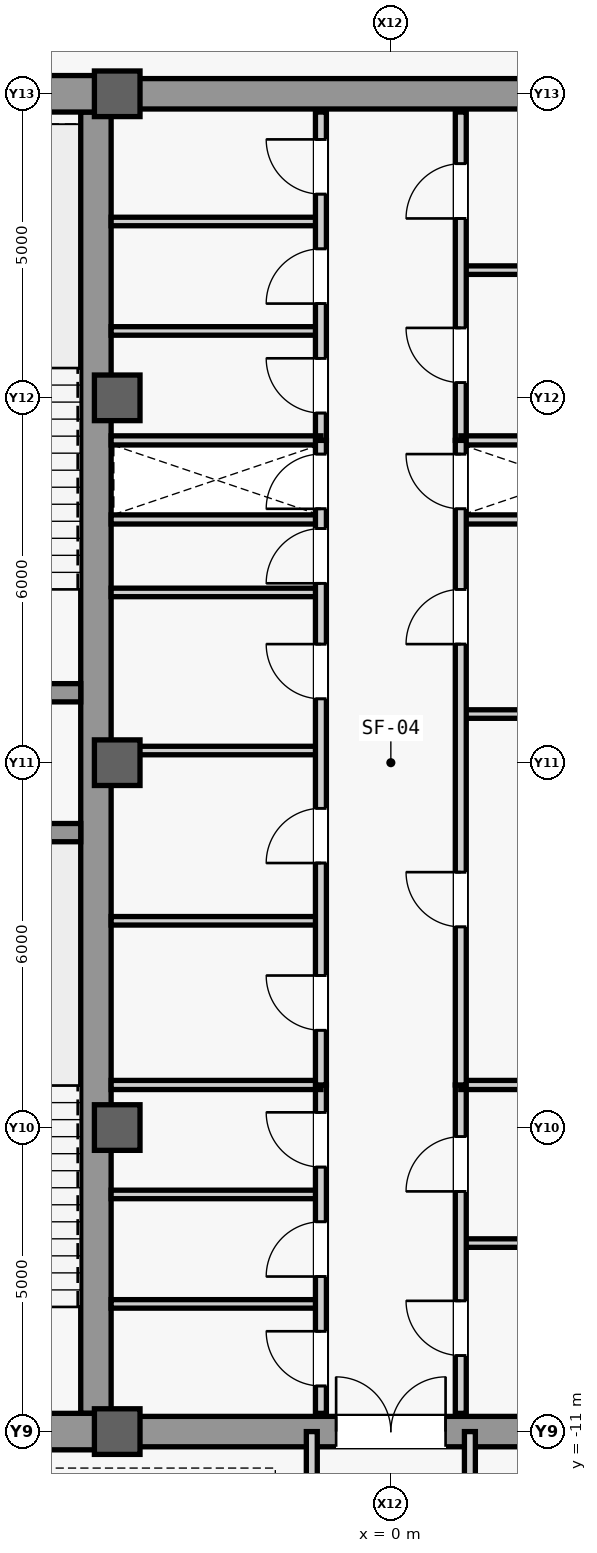
"""IFC4 building model, lengths in metres.
Left out: names, types, materials, properties, quantities, classifications, styles, units other than length and angle.
Written with IfcOpenShell. Run it as: python <this file> out.ifc"""

import sys

from ifc_helpers import new_model, si_unit, direction, frame, frame_2d, origin, origin_2d, place, context, subcontext, project, spatial, rectangle, extrude, source, transform, mapped, element, fill, save


model = new_model("IFC4")
c1 = context("Model", 3, precision=1e-05, world=origin(), true_north=direction((0.0, 1.0)))
c2 = subcontext(c1, "Body", "Model", "MODEL_VIEW")
j1 = project(units=[si_unit("LENGTHUNIT", "METRE"), si_unit("PLANEANGLEUNIT", "RADIAN")], contexts=[c1])
p1 = place(None, origin())
s1 = spatial("IfcSite", under=j1, at=p1, CompositionType="ELEMENT")
p2 = place(p1, origin())
s2 = spatial("IfcBuilding", under=s1, at=p2, CompositionType="ELEMENT")
p3 = place(p2, frame((0.0, 0.0, 321.5)))
s3 = spatial("IfcBuildingStorey", under=s2, at=p3, CompositionType="ELEMENT", Elevation=321.5)
m1 = source(origin(), c2, "Body", "SweptSolid", [
    extrude(rectangle(XDim=21.4, YDim=0.5, at=frame_2d((10.7, 0.0))), origin(), (0.0, 0.0, 1.0), 4.54),
])
p4 = place(p3, frame((-4.85, -10.7, 0.0), z_axis=(0.0, 0.0, 1.0), x_axis=(0.0, 1.0, 0.0)))
e1 = element("IfcWall", 1, at=p4, inside=s3, PredefinedType="SHEAR", context=c2, shape_type="MappedRepresentation", body=[
    mapped(m1, transform((0.0, 0.0, 0.0), scale=1.0)),
])
m2 = source(origin(), c2, "Body", "SweptSolid", [
    extrude(rectangle(XDim=5.9, YDim=0.6, at=frame_2d((2.95, 0.0))), origin(), (0.0, 0.0, 1.0), 4.54),
])
for number, where, z_axis, x_axis in (
    (2, (-10.75, -11.0, 0.0), (0.0, 0.0, 1.0), (1.0, 0.0, 0.0)),
    (3, (-10.75, 11.0, 0.0), (0.0, 0.0, 1.0), (1.0, 0.0, 0.0)),
):
    element("IfcWall", number, at=place(p3, frame(where, z_axis=z_axis, x_axis=x_axis)), inside=s3, PredefinedType="SHEAR", context=c2, shape_type="MappedRepresentation", body=[
        mapped(m2, transform((0.0, 0.0, 0.0), scale=1.0)),
    ])
m3 = source(origin(), c2, "Body", "SweptSolid", [
    extrude(rectangle(XDim=5.65, YDim=0.3, at=frame_2d((2.825, 0.0))), origin(), (0.0, 0.0, 1.0), 4.54),
])
for number, where, z_axis, x_axis in (
    (4, (-10.75, -1.15, 0.0), (0.0, 0.0, 1.0), (1.0, 0.0, 0.0)),
    (5, (-10.75, 1.15, 0.0), (0.0, 0.0, 1.0), (1.0, 0.0, 0.0)),
):
    element("IfcWall", number, at=place(p3, frame(where, z_axis=z_axis, x_axis=x_axis)), inside=s3, PredefinedType="SHEAR", context=c2, shape_type="MappedRepresentation", body=[
        mapped(m3, transform((0.0, 0.0, 0.0), scale=1.0)),
    ])
m4 = source(origin(), c2, "Body", "SweptSolid", [
    extrude(rectangle(XDim=9.2, YDim=0.5, at=frame_2d((4.6, 0.0))), origin(), (0.0, 0.0, 1.0), 4.54),
])
p5 = place(p3, frame((-4.6, -11.0, 0.0), z_axis=(0.0, 0.0, 1.0), x_axis=(1.0, 0.0, 0.0)))
e6 = element("IfcWall", 6, at=p5, inside=s3, PredefinedType="SHEAR", context=c2, shape_type="MappedRepresentation", body=[
    mapped(m4, transform((0.0, 0.0, 0.0), scale=1.0)),
])
m5 = source(origin(), c2, "Body", "SweptSolid", [
    extrude(rectangle(XDim=1.8, YDim=2.25, at=frame_2d((0.9, 1.125))), frame((0.0, 0.26, 0.0), z_axis=(0.0, -1.0, 0.0), x_axis=(1.0, 0.0, 0.0)), (0.0, 0.0, 1.0), 0.52),
])
p6 = place(p5, frame((3.7, 0.0, 0.0)))
e7 = element("IfcOpeningElement", 7, at=p6, cuts=e6, PredefinedType="OPENING", context=c2, shape_type="MappedRepresentation", body=[
    mapped(m5, transform((0.0, 0.0, 0.0), scale=1.0)),
])
p7 = place(p3, frame((-4.6, 11.0, 0.0), z_axis=(0.0, 0.0, 1.0), x_axis=(1.0, 0.0, 0.0)))
e8 = element("IfcWall", 8, at=p7, inside=s3, PredefinedType="SHEAR", context=c2, shape_type="MappedRepresentation", body=[
    mapped(m4, transform((0.0, 0.0, 0.0), scale=1.0)),
])
m6 = source(origin(), c2, "Body", "SweptSolid", [
    extrude(rectangle(XDim=0.75, YDim=0.75, at=origin_2d()), origin(), (0.0, 0.0, 1.0), 4.8),
])
for number, where, z_axis, x_axis in (
    (9, (-4.5, -11.0, 0.0), (0.0, 0.0, 1.0), (1.0, 0.0, 0.0)),
    (10, (-4.5, -6.0, 0.0), (0.0, 0.0, 1.0), (1.0, 0.0, 0.0)),
    (11, (-4.5, 0.0, 0.0), (0.0, 0.0, 1.0), (1.0, 0.0, 0.0)),
    (12, (-4.5, 6.0, 0.0), (0.0, 0.0, 1.0), (1.0, 0.0, 0.0)),
    (13, (-4.5, 11.0, 0.0), (0.0, 0.0, 1.0), (1.0, 0.0, 0.0)),
):
    element("IfcColumn", number, at=place(p3, frame(where, z_axis=z_axis, x_axis=x_axis)), inside=s3, PredefinedType="COLUMN", context=c2, shape_type="MappedRepresentation", body=[
        mapped(m6, transform((0.0, 0.0, 0.0), scale=1.0)),
    ])
m7 = source(origin(), c2, "Body", "SweptSolid", [
    extrude(rectangle(XDim=3.45, YDim=0.15, at=frame_2d((1.725, 0.0))), origin(), (0.0, 0.0, 1.0), 4.54),
])
for number, where, z_axis, x_axis in (
    (14, (-4.6, 4.0, 0.0), (0.0, 0.0, 1.0), (1.0, 0.0, 0.0)),
    (15, (1.15, 4.0, 0.0), (0.0, 0.0, 1.0), (1.0, 0.0, 0.0)),
):
    element("IfcWall", number, at=place(p3, frame(where, z_axis=z_axis, x_axis=x_axis)), inside=s3, PredefinedType="PARTITIONING", context=c2, shape_type="MappedRepresentation", body=[
        mapped(m7, transform((0.0, 0.0, 0.0), scale=1.0)),
    ])
m8 = source(origin(), c2, "Body", "SweptSolid", [
    extrude(rectangle(XDim=3.45, YDim=0.14, at=frame_2d((1.725, 0.0))), origin(), (0.0, 0.0, 1.0), 4.54),
])
for number, where, z_axis, x_axis in (
    (16, (-4.6, -8.9, 0.0), (0.0, 0.0, 1.0), (1.0, 0.0, 0.0)),
    (17, (-4.6, -7.1, 0.0), (0.0, 0.0, 1.0), (1.0, 0.0, 0.0)),
):
    element("IfcWall", number, at=place(p3, frame(where, z_axis=z_axis, x_axis=x_axis)), inside=s3, PredefinedType="PARTITIONING", context=c2, shape_type="MappedRepresentation", body=[
        mapped(m8, transform((0.0, 0.0, 0.0), scale=1.0)),
    ])
m9 = source(origin(), c2, "Body", "SweptSolid", [
    extrude(rectangle(XDim=5.4, YDim=0.18, at=frame_2d((2.7, 0.0))), origin(), (0.0, 0.0, 1.0), 4.54),
])
p8 = place(p3, frame((-1.15, -10.7, 0.0), z_axis=(0.0, 0.0, 1.0), x_axis=(0.0, 1.0, 0.0)))
e18 = element("IfcWall", 18, at=p8, inside=s3, PredefinedType="PARTITIONING", context=c2, shape_type="MappedRepresentation", body=[
    mapped(m9, transform((0.0, 0.0, 0.0), scale=1.0)),
])
m10 = source(origin(), c2, "Body", "SweptSolid", [
    extrude(rectangle(XDim=0.9, YDim=2.15, at=frame_2d((0.45, 1.075))), frame((0.0, 0.1, 0.0), z_axis=(0.0, -1.0, 0.0), x_axis=(1.0, 0.0, 0.0)), (0.0, 0.0, 1.0), 0.2),
])
p9 = place(p8, frame((0.45, 0.0, 0.0)))
e19 = element("IfcOpeningElement", 19, at=p9, cuts=e18, PredefinedType="OPENING", context=c2, shape_type="MappedRepresentation", body=[
    mapped(m10, transform((0.0, 0.0, 0.0), scale=1.0)),
])
p10 = place(p8, frame((2.25, 0.0, 0.0)))
e20 = element("IfcOpeningElement", 20, at=p10, cuts=e18, PredefinedType="OPENING", context=c2, shape_type="MappedRepresentation", body=[
    mapped(m10, transform((0.0, 0.0, 0.0), scale=1.0)),
])
p11 = place(p8, frame((4.05, 0.0, 0.0)))
e21 = element("IfcOpeningElement", 21, at=p11, cuts=e18, PredefinedType="OPENING", context=c2, shape_type="MappedRepresentation", body=[
    mapped(m10, transform((0.0, 0.0, 0.0), scale=1.0)),
])
p12 = place(p3, frame((1.15, -7.9, 0.0), z_axis=(0.0, 0.0, 1.0), x_axis=(1.0, 0.0, 0.0)))
e22 = element("IfcWall", 22, at=p12, inside=s3, PredefinedType="PARTITIONING", context=c2, shape_type="MappedRepresentation", body=[
    mapped(m8, transform((0.0, 0.0, 0.0), scale=1.0)),
])
p13 = place(p3, frame((1.15, -10.7, 0.0), z_axis=(0.0, 0.0, 1.0), x_axis=(0.0, 1.0, 0.0)))
e23 = element("IfcWall", 23, at=p13, inside=s3, PredefinedType="PARTITIONING", context=c2, shape_type="MappedRepresentation", body=[
    mapped(m9, transform((0.0, 0.0, 0.0), scale=1.0)),
])
p14 = place(p13, frame((0.95, 0.0, 0.0)))
e24 = element("IfcOpeningElement", 24, at=p14, cuts=e23, PredefinedType="OPENING", context=c2, shape_type="MappedRepresentation", body=[
    mapped(m10, transform((0.0, 0.0, 0.0), scale=1.0)),
])
p15 = place(p13, frame((3.65, 0.0, 0.0)))
e25 = element("IfcOpeningElement", 25, at=p15, cuts=e23, PredefinedType="OPENING", context=c2, shape_type="MappedRepresentation", body=[
    mapped(m10, transform((0.0, 0.0, 0.0), scale=1.0)),
])
for number, where, z_axis, x_axis in (
    (26, (-4.6, -5.3, 0.0), (0.0, 0.0, 1.0), (1.0, 0.0, 0.0)),
    (27, (1.15, -5.3, 0.0), (0.0, 0.0, 1.0), (1.0, 0.0, 0.0)),
):
    element("IfcWall", number, at=place(p3, frame(where, z_axis=z_axis, x_axis=x_axis)), inside=s3, PredefinedType="PARTITIONING", context=c2, shape_type="MappedRepresentation", body=[
        mapped(m7, transform((0.0, 0.0, 0.0), scale=1.0)),
    ])
for number, where, z_axis, x_axis in (
    (28, (-4.6, 7.1, 0.0), (0.0, 0.0, 1.0), (1.0, 0.0, 0.0)),
    (29, (-4.6, 8.9, 0.0), (0.0, 0.0, 1.0), (1.0, 0.0, 0.0)),
):
    element("IfcWall", number, at=place(p3, frame(where, z_axis=z_axis, x_axis=x_axis)), inside=s3, PredefinedType="PARTITIONING", context=c2, shape_type="MappedRepresentation", body=[
        mapped(m8, transform((0.0, 0.0, 0.0), scale=1.0)),
    ])
p16 = place(p3, frame((-1.15, 5.3, 0.0), z_axis=(0.0, 0.0, 1.0), x_axis=(0.0, 1.0, 0.0)))
e30 = element("IfcWall", 30, at=p16, inside=s3, PredefinedType="PARTITIONING", context=c2, shape_type="MappedRepresentation", body=[
    mapped(m9, transform((0.0, 0.0, 0.0), scale=1.0)),
])
p17 = place(p16, frame((0.45, 0.0, 0.0)))
e31 = element("IfcOpeningElement", 31, at=p17, cuts=e30, PredefinedType="OPENING", context=c2, shape_type="MappedRepresentation", body=[
    mapped(m10, transform((0.0, 0.0, 0.0), scale=1.0)),
])
p18 = place(p16, frame((2.25, 0.0, 0.0)))
e32 = element("IfcOpeningElement", 32, at=p18, cuts=e30, PredefinedType="OPENING", context=c2, shape_type="MappedRepresentation", body=[
    mapped(m10, transform((0.0, 0.0, 0.0), scale=1.0)),
])
p19 = place(p16, frame((4.05, 0.0, 0.0)))
e33 = element("IfcOpeningElement", 33, at=p19, cuts=e30, PredefinedType="OPENING", context=c2, shape_type="MappedRepresentation", body=[
    mapped(m10, transform((0.0, 0.0, 0.0), scale=1.0)),
])
p20 = place(p3, frame((1.15, 8.1, 0.0), z_axis=(0.0, 0.0, 1.0), x_axis=(1.0, 0.0, 0.0)))
e34 = element("IfcWall", 34, at=p20, inside=s3, PredefinedType="PARTITIONING", context=c2, shape_type="MappedRepresentation", body=[
    mapped(m8, transform((0.0, 0.0, 0.0), scale=1.0)),
])
p21 = place(p3, frame((1.15, 5.3, 0.0), z_axis=(0.0, 0.0, 1.0), x_axis=(0.0, 1.0, 0.0)))
e35 = element("IfcWall", 35, at=p21, inside=s3, PredefinedType="PARTITIONING", context=c2, shape_type="MappedRepresentation", body=[
    mapped(m9, transform((0.0, 0.0, 0.0), scale=1.0)),
])
p22 = place(p21, frame((0.95, 0.0, 0.0)))
e36 = element("IfcOpeningElement", 36, at=p22, cuts=e35, PredefinedType="OPENING", context=c2, shape_type="MappedRepresentation", body=[
    mapped(m10, transform((0.0, 0.0, 0.0), scale=1.0)),
])
p23 = place(p21, frame((3.65, 0.0, 0.0)))
e37 = element("IfcOpeningElement", 37, at=p23, cuts=e35, PredefinedType="OPENING", context=c2, shape_type="MappedRepresentation", body=[
    mapped(m10, transform((0.0, 0.0, 0.0), scale=1.0)),
])
for number, where, z_axis, x_axis in (
    (38, (-4.6, 5.3, 0.0), (0.0, 0.0, 1.0), (1.0, 0.0, 0.0)),
    (39, (1.15, 5.3, 0.0), (0.0, 0.0, 1.0), (1.0, 0.0, 0.0)),
):
    element("IfcWall", number, at=place(p3, frame(where, z_axis=z_axis, x_axis=x_axis)), inside=s3, PredefinedType="PARTITIONING", context=c2, shape_type="MappedRepresentation", body=[
        mapped(m7, transform((0.0, 0.0, 0.0), scale=1.0)),
    ])
p24 = place(p3, frame((-4.6, -2.6, 0.0), z_axis=(0.0, 0.0, 1.0), x_axis=(1.0, 0.0, 0.0)))
e40 = element("IfcWall", 40, at=p24, inside=s3, PredefinedType="PARTITIONING", context=c2, shape_type="MappedRepresentation", body=[
    mapped(m8, transform((0.0, 0.0, 0.0), scale=1.0)),
])
m11 = source(origin(), c2, "Body", "SweptSolid", [
    extrude(rectangle(XDim=3.45, YDim=0.14, at=frame_2d((1.725, 0.0))), origin(), (0.0, 0.0, 1.0), 3.845),
])
p25 = place(p3, frame((-4.6, 0.2, 0.0), z_axis=(0.0, 0.0, 1.0), x_axis=(1.0, 0.0, 0.0)))
e41 = element("IfcWall", 41, at=p25, inside=s3, PredefinedType="PARTITIONING", context=c2, shape_type="MappedRepresentation", body=[
    mapped(m11, transform((0.0, 0.0, 0.0), scale=1.0)),
])
p26 = place(p3, frame((-4.6, 2.8, 0.0), z_axis=(0.0, 0.0, 1.0), x_axis=(1.0, 0.0, 0.0)))
e42 = element("IfcWall", 42, at=p26, inside=s3, PredefinedType="PARTITIONING", context=c2, shape_type="MappedRepresentation", body=[
    mapped(m8, transform((0.0, 0.0, 0.0), scale=1.0)),
])
m12 = source(origin(), c2, "Body", "SweptSolid", [
    extrude(rectangle(XDim=10.6, YDim=0.18, at=frame_2d((5.3, 0.0))), origin(), (0.0, 0.0, 1.0), 4.54),
])
p27 = place(p3, frame((-1.15, -5.3, 0.0), z_axis=(0.0, 0.0, 1.0), x_axis=(0.0, 1.0, 0.0)))
e43 = element("IfcWall", 43, at=p27, inside=s3, PredefinedType="PARTITIONING", context=c2, shape_type="MappedRepresentation", body=[
    mapped(m12, transform((0.0, 0.0, 0.0), scale=1.0)),
])
p28 = place(p27, frame((0.9, 0.0, 0.0)))
e44 = element("IfcOpeningElement", 44, at=p28, cuts=e43, PredefinedType="OPENING", context=c2, shape_type="MappedRepresentation", body=[
    mapped(m10, transform((0.0, 0.0, 0.0), scale=1.0)),
])
p29 = place(p27, frame((3.65, 0.0, 0.0)))
e45 = element("IfcOpeningElement", 45, at=p29, cuts=e43, PredefinedType="OPENING", context=c2, shape_type="MappedRepresentation", body=[
    mapped(m10, transform((0.0, 0.0, 0.0), scale=1.0)),
])
p30 = place(p27, frame((6.35, 0.0, 0.0)))
e46 = element("IfcOpeningElement", 46, at=p30, cuts=e43, PredefinedType="OPENING", context=c2, shape_type="MappedRepresentation", body=[
    mapped(m10, transform((0.0, 0.0, 0.0), scale=1.0)),
])
p31 = place(p27, frame((8.25, 0.0, 0.0)))
e47 = element("IfcOpeningElement", 47, at=p31, cuts=e43, PredefinedType="OPENING", context=c2, shape_type="MappedRepresentation", body=[
    mapped(m10, transform((0.0, 0.0, 0.0), scale=1.0)),
])
p32 = place(p27, frame((9.475, 0.0, 0.0)))
e48 = element("IfcOpeningElement", 48, at=p32, cuts=e43, PredefinedType="OPENING", context=c2, shape_type="MappedRepresentation", body=[
    mapped(m10, transform((0.0, 0.0, 0.0), scale=1.0)),
])
p33 = place(p3, frame((1.15, 0.8, 0.0), z_axis=(0.0, 0.0, 1.0), x_axis=(1.0, 0.0, 0.0)))
e49 = element("IfcWall", 49, at=p33, inside=s3, PredefinedType="PARTITIONING", context=c2, shape_type="MappedRepresentation", body=[
    mapped(m8, transform((0.0, 0.0, 0.0), scale=1.0)),
])
p34 = place(p3, frame((1.15, -5.3, 0.0), z_axis=(0.0, 0.0, 1.0), x_axis=(0.0, 1.0, 0.0)))
e50 = element("IfcWall", 50, at=p34, inside=s3, PredefinedType="PARTITIONING", context=c2, shape_type="MappedRepresentation", body=[
    mapped(m12, transform((0.0, 0.0, 0.0), scale=1.0)),
])
p35 = place(p34, frame((2.6, 0.0, 0.0)))
e51 = element("IfcOpeningElement", 51, at=p35, cuts=e50, PredefinedType="OPENING", context=c2, shape_type="MappedRepresentation", body=[
    mapped(m10, transform((0.0, 0.0, 0.0), scale=1.0)),
])
p36 = place(p34, frame((7.25, 0.0, 0.0)))
e52 = element("IfcOpeningElement", 52, at=p36, cuts=e50, PredefinedType="OPENING", context=c2, shape_type="MappedRepresentation", body=[
    mapped(m10, transform((0.0, 0.0, 0.0), scale=1.0)),
])
p37 = place(p34, frame((9.475, 0.0, 0.0)))
e53 = element("IfcOpeningElement", 53, at=p37, cuts=e50, PredefinedType="OPENING", context=c2, shape_type="MappedRepresentation", body=[
    mapped(m10, transform((0.0, 0.0, 0.0), scale=1.0)),
])
m13 = source(origin(), c2, "Body", "SweptSolid", [
    extrude(rectangle(XDim=5.3, YDim=0.18, at=frame_2d((2.65, 0.0))), origin(), (0.0, 0.0, 1.0), 4.54),
])
for number, where, z_axis, x_axis in (
    (54, (-1.3, -16.3, 0.0), (0.0, 0.0, 1.0), (0.0, 1.0, 0.0)),
    (55, (1.3, -16.3, 0.0), (0.0, 0.0, 1.0), (0.0, 1.0, 0.0)),
):
    element("IfcWall", number, at=place(p3, frame(where, z_axis=z_axis, x_axis=x_axis)), inside=s3, PredefinedType="PARTITIONING", context=c2, shape_type="MappedRepresentation", body=[
        mapped(m13, transform((0.0, 0.0, 0.0), scale=1.0)),
    ])
m14 = source(origin(), c2, "Body", "SweptSolid", [
    extrude(rectangle(XDim=0.9, YDim=2.15, at=frame_2d((0.45, 1.075))), frame((0.0, 0.025, 0.0), z_axis=(0.0, -1.0, 0.0), x_axis=(1.0, 0.0, 0.0)), (0.0, 0.0, 1.0), 0.05),
])
p38 = place(p9, origin())
e56 = element("IfcDoor", 56, at=p38, inside=s3, OperationType="SINGLE_SWING_RIGHT", PredefinedType="DOOR", context=c2, shape_type="MappedRepresentation", body=[
    mapped(m14, transform((0.0, 0.0, 0.0), scale=1.0)),
])
fill(e19, e56)
p39 = place(p10, origin())
e57 = element("IfcDoor", 57, at=p39, inside=s3, OperationType="SINGLE_SWING_LEFT", PredefinedType="DOOR", context=c2, shape_type="MappedRepresentation", body=[
    mapped(m14, transform((0.0, 0.0, 0.0), scale=1.0)),
])
fill(e20, e57)
p40 = place(p11, origin())
e58 = element("IfcDoor", 58, at=p40, inside=s3, OperationType="SINGLE_SWING_RIGHT", PredefinedType="DOOR", context=c2, shape_type="MappedRepresentation", body=[
    mapped(m14, transform((0.0, 0.0, 0.0), scale=1.0)),
])
fill(e21, e58)
p41 = place(p14, origin())
e59 = element("IfcDoor", 59, at=p41, inside=s3, OperationType="SINGLE_SWING_RIGHT", PredefinedType="DOOR", context=c2, shape_type="MappedRepresentation", body=[
    mapped(m14, transform((0.0, 0.0, 0.0), scale=1.0)),
])
fill(e24, e59)
p42 = place(p15, origin())
e60 = element("IfcDoor", 60, at=p42, inside=s3, OperationType="SINGLE_SWING_LEFT", PredefinedType="DOOR", context=c2, shape_type="MappedRepresentation", body=[
    mapped(m14, transform((0.0, 0.0, 0.0), scale=1.0)),
])
fill(e25, e60)
m15 = source(origin(), c2, "Body", "SweptSolid", [
    extrude(rectangle(XDim=1.8, YDim=2.25, at=frame_2d((0.9, 1.125))), frame((0.0, 0.025, 0.0), z_axis=(0.0, -1.0, 0.0), x_axis=(1.0, 0.0, 0.0)), (0.0, 0.0, 1.0), 0.05),
])
p43 = place(p6, origin())
e61 = element("IfcDoor", 61, at=p43, inside=s3, OperationType="SINGLE_SWING_LEFT", PredefinedType="DOOR", context=c2, shape_type="MappedRepresentation", body=[
    mapped(m15, transform((0.0, 0.0, 0.0), scale=1.0)),
])
fill(e7, e61)
p44 = place(p17, origin())
e62 = element("IfcDoor", 62, at=p44, inside=s3, OperationType="SINGLE_SWING_RIGHT", PredefinedType="DOOR", context=c2, shape_type="MappedRepresentation", body=[
    mapped(m14, transform((0.0, 0.0, 0.0), scale=1.0)),
])
fill(e31, e62)
p45 = place(p18, origin())
e63 = element("IfcDoor", 63, at=p45, inside=s3, OperationType="SINGLE_SWING_LEFT", PredefinedType="DOOR", context=c2, shape_type="MappedRepresentation", body=[
    mapped(m14, transform((0.0, 0.0, 0.0), scale=1.0)),
])
fill(e32, e63)
p46 = place(p19, origin())
e64 = element("IfcDoor", 64, at=p46, inside=s3, OperationType="SINGLE_SWING_RIGHT", PredefinedType="DOOR", context=c2, shape_type="MappedRepresentation", body=[
    mapped(m14, transform((0.0, 0.0, 0.0), scale=1.0)),
])
fill(e33, e64)
p47 = place(p22, origin())
e65 = element("IfcDoor", 65, at=p47, inside=s3, OperationType="SINGLE_SWING_RIGHT", PredefinedType="DOOR", context=c2, shape_type="MappedRepresentation", body=[
    mapped(m14, transform((0.0, 0.0, 0.0), scale=1.0)),
])
fill(e36, e65)
p48 = place(p23, origin())
e66 = element("IfcDoor", 66, at=p48, inside=s3, OperationType="SINGLE_SWING_LEFT", PredefinedType="DOOR", context=c2, shape_type="MappedRepresentation", body=[
    mapped(m14, transform((0.0, 0.0, 0.0), scale=1.0)),
])
fill(e37, e66)
p49 = place(p28, origin())
e67 = element("IfcDoor", 67, at=p49, inside=s3, OperationType="SINGLE_SWING_RIGHT", PredefinedType="DOOR", context=c2, shape_type="MappedRepresentation", body=[
    mapped(m14, transform((0.0, 0.0, 0.0), scale=1.0)),
])
fill(e44, e67)
p50 = place(p29, origin())
e68 = element("IfcDoor", 68, at=p50, inside=s3, OperationType="SINGLE_SWING_LEFT", PredefinedType="DOOR", context=c2, shape_type="MappedRepresentation", body=[
    mapped(m14, transform((0.0, 0.0, 0.0), scale=1.0)),
])
fill(e45, e68)
p51 = place(p30, origin())
e69 = element("IfcDoor", 69, at=p51, inside=s3, OperationType="SINGLE_SWING_RIGHT", PredefinedType="DOOR", context=c2, shape_type="MappedRepresentation", body=[
    mapped(m14, transform((0.0, 0.0, 0.0), scale=1.0)),
])
fill(e46, e69)
p52 = place(p31, origin())
e70 = element("IfcDoor", 70, at=p52, inside=s3, OperationType="SINGLE_SWING_LEFT", PredefinedType="DOOR", context=c2, shape_type="MappedRepresentation", body=[
    mapped(m14, transform((0.0, 0.0, 0.0), scale=1.0)),
])
fill(e47, e70)
p53 = place(p35, origin())
e71 = element("IfcDoor", 71, at=p53, inside=s3, OperationType="SINGLE_SWING_RIGHT", PredefinedType="DOOR", context=c2, shape_type="MappedRepresentation", body=[
    mapped(m14, transform((0.0, 0.0, 0.0), scale=1.0)),
])
fill(e51, e71)
p54 = place(p36, origin())
e72 = element("IfcDoor", 72, at=p54, inside=s3, OperationType="SINGLE_SWING_LEFT", PredefinedType="DOOR", context=c2, shape_type="MappedRepresentation", body=[
    mapped(m14, transform((0.0, 0.0, 0.0), scale=1.0)),
])
fill(e52, e72)
p55 = place(p32, origin())
e73 = element("IfcDoor", 73, at=p55, inside=s3, OperationType="SINGLE_SWING_LEFT", PredefinedType="DOOR", context=c2, shape_type="MappedRepresentation", body=[
    mapped(m14, transform((0.0, 0.0, 0.0), scale=1.0)),
])
fill(e48, e73)
p56 = place(p37, origin())
e74 = element("IfcDoor", 74, at=p56, inside=s3, OperationType="SINGLE_SWING_RIGHT", PredefinedType="DOOR", context=c2, shape_type="MappedRepresentation", body=[
    mapped(m14, transform((0.0, 0.0, 0.0), scale=1.0)),
])
fill(e53, e74)
save(model, sys.argv[1])
